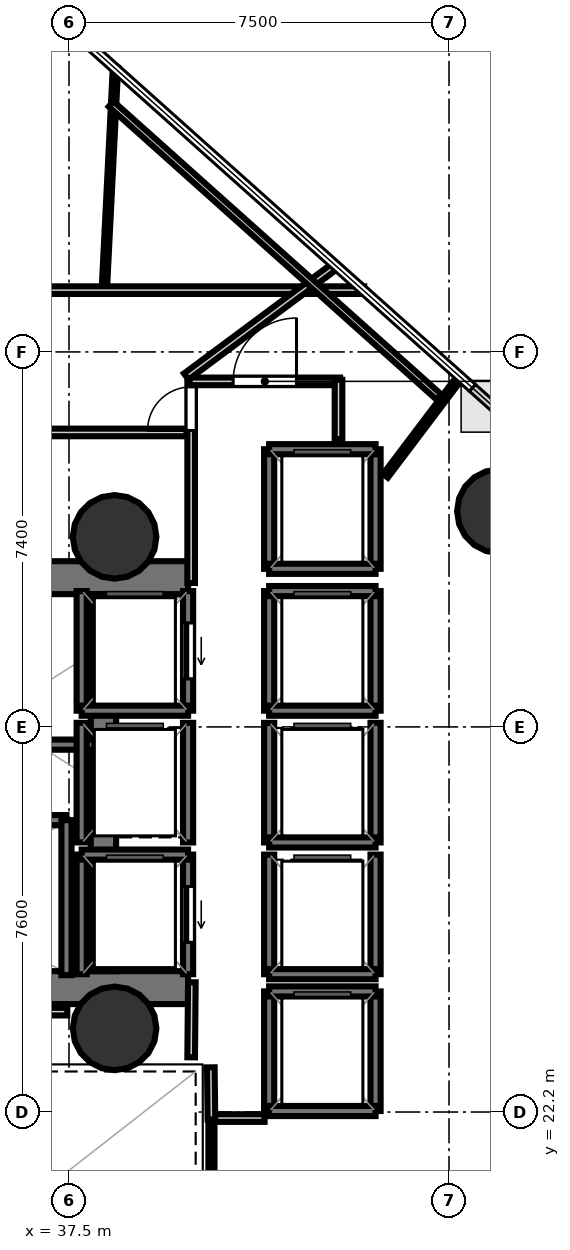
"""IFC4 building model, lengths in metres.
Left out: names, types, materials, properties, quantities, classifications, styles, units other than length and angle.
Written with IfcOpenShell. Run it as: python <this file> out.ifc"""

import sys

from ifc_helpers import new_model, si_unit, direction, frame, frame_2d, origin, origin_2d, place, context, subcontext, project, spatial, rectangle, hollow_circle, extrude, element, fill, save


model = new_model("IFC4")
c1 = context("Model", 3, precision=1e-05, world=origin(), true_north=direction((0.0, 1.0)))
c2 = subcontext(c1, "Body", "Model", "MODEL_VIEW")
j1 = project(units=[si_unit("LENGTHUNIT", "METRE"), si_unit("PLANEANGLEUNIT", "RADIAN")], contexts=[c1])
p1 = place(None, origin())
s1 = spatial("IfcSite", under=j1, at=p1, CompositionType="ELEMENT")
p2 = place(p1, origin())
s2 = spatial("IfcBuilding", under=s1, at=p2, CompositionType="ELEMENT")
p3 = place(p2, frame((0.0, 0.0, 71.0)))
s3 = spatial("IfcBuildingStorey", under=s2, at=p3, CompositionType="ELEMENT", Elevation=71.0)
p4 = place(p3, frame((29.13, 32.745, 0.0), z_axis=(0.0, 0.0, 1.0), x_axis=(1.0, 0.0, 0.0)))
e1 = element("IfcWall", 1, at=p4, inside=s3, PredefinedType="SHEAR", context=c2, shape_type="SweptSolid", body=[
    extrude(rectangle(XDim=10.72, YDim=0.65, at=frame_2d((5.36, 0.0))), origin(), (0.0, 0.0, 1.0), 3.52),
])
p5 = place(p4, frame((1.095, 0.0, 0.0)))
e2 = element("IfcOpeningElement", 2, at=p5, cuts=e1, PredefinedType="OPENING", context=c2, shape_type="SweptSolid", body=[
    extrude(rectangle(XDim=1.25, YDim=2.15, at=frame_2d((0.625, 1.075))), frame((0.0, 0.335, 0.0), z_axis=(0.0, -1.0, 0.0), x_axis=(1.0, 0.0, 0.0)), (0.0, 0.0, 1.0), 0.67),
])
p6 = place(p3, frame((29.13, 24.655, 0.0), z_axis=(0.0, 0.0, 1.0), x_axis=(1.0, 0.0, 0.0)))
e3 = element("IfcWall", 3, at=p6, inside=s3, PredefinedType="SHEAR", context=c2, shape_type="SweptSolid", body=[
    extrude(rectangle(XDim=10.72, YDim=0.65, at=frame_2d((5.36, 0.0))), origin(), (0.0, 0.0, 1.0), 3.52),
])
p7 = place(p6, frame((0.895, 0.0, 0.0)))
e4 = element("IfcOpeningElement", 4, at=p7, cuts=e3, PredefinedType="OPENING", context=c2, shape_type="SweptSolid", body=[
    extrude(rectangle(XDim=1.25, YDim=2.15, at=frame_2d((0.625, 1.075))), frame((0.0, 0.335, 0.0), z_axis=(0.0, -1.0, 0.0), x_axis=(1.0, 0.0, 0.0)), (0.0, 0.0, 1.0), 0.67),
])
p8 = place(p3, frame((38.18, 24.98, 0.0), z_axis=(0.0, 0.0, 1.0), x_axis=(0.0, 1.0, 0.0)))
e5 = element("IfcWall", 5, at=p8, inside=s3, PredefinedType="SHEAR", context=c2, shape_type="SweptSolid", body=[
    extrude(rectangle(XDim=7.44, YDim=0.5, at=frame_2d((3.72, 0.0))), origin(), (0.0, 0.0, 1.0), 3.52),
])
for number, where, z_axis, x_axis in (
    (6, (38.4, 33.55, 0.0), (0.0, 0.0, 1.0), (1.0, 0.0, 0.0)),
    (7, (38.4, 23.85, 0.0), (0.0, 0.0, 1.0), (1.0, 0.0, 0.0)),
    (8, (45.984, 34.057, 0.0), (0.0, 0.0, 1.0), (1.0, 0.0, 0.0)),
):
    element("IfcColumn", number, at=place(p3, frame(where, z_axis=z_axis, x_axis=x_axis)), inside=s3, PredefinedType="COLUMN", context=c2, shape_type="SweptSolid", body=[
        extrude(hollow_circle(Radius=0.825, WallThickness=0.04, at=origin_2d()), origin(), (0.0, 0.0, 1.0), 3.7),
    ])
p9 = place(p3, frame((29.7, 29.45, 0.0), z_axis=(0.0, 0.0, 1.0), x_axis=(1.0, 0.0, 0.0)))
e9 = element("IfcWall", 9, at=p9, inside=s3, PredefinedType="SOLIDWALL", context=c2, shape_type="SweptSolid", body=[
    extrude(rectangle(XDim=8.3, YDim=0.2, at=frame_2d((4.15, 0.0))), origin(), (0.0, 0.0, 1.0), 3.52),
])
p10 = place(p3, frame((29.7, 27.96, 0.0), z_axis=(0.0, 0.0, 1.0), x_axis=(1.0, 0.0, 0.0)))
e10 = element("IfcWall", 10, at=p10, inside=s3, PredefinedType="SOLIDWALL", context=c2, shape_type="SweptSolid", body=[
    extrude(rectangle(XDim=7.75, YDim=0.2, at=frame_2d((3.875, 0.0))), origin(), (0.0, 0.0, 1.0), 3.52),
])
p11 = place(p3, frame((37.45, 24.9, 0.0), z_axis=(0.0, 0.0, 1.0), x_axis=(0.0, 1.0, 0.0)))
e11 = element("IfcWall", 11, at=p11, inside=s3, PredefinedType="SOLIDWALL", context=c2, shape_type="SweptSolid", body=[
    extrude(rectangle(XDim=3.06, YDim=0.2, at=frame_2d((1.53, 0.0))), origin(), (0.0, 0.0, 1.0), 3.52),
])
p12 = place(p3, frame((39.85, 30.12, 0.0), z_axis=(0.0, 0.0, 1.0), x_axis=(0.0, 1.0, 0.0)))
e12 = element("IfcWall", 12, at=p12, inside=s3, PredefinedType="SOLIDWALL", context=c2, shape_type="SweptSolid", body=[
    extrude(rectangle(XDim=2.36, YDim=0.2, at=frame_2d((1.18, 0.0))), origin(), (0.0, 0.0, 1.0), 3.52),
])
p13 = place(p12, frame((0.63, 0.0, 0.0)))
e13 = element("IfcOpeningElement", 13, at=p13, cuts=e12, PredefinedType="OPENING", context=c2, shape_type="SweptSolid", body=[
    extrude(rectangle(XDim=1.1, YDim=2.15, at=frame_2d((0.55, 1.075))), frame((0.0, 0.11, 0.0), z_axis=(0.0, -1.0, 0.0), x_axis=(1.0, 0.0, 0.0)), (0.0, 0.0, 1.0), 0.22),
])
p14 = place(p3, frame((37.75, 30.12, 0.0), z_axis=(0.0, 0.0, 1.0), x_axis=(0.0, 1.0, 0.0)))
e14 = element("IfcWall", 14, at=p14, inside=s3, PredefinedType="SOLIDWALL", context=c2, shape_type="SweptSolid", body=[
    extrude(rectangle(XDim=2.36, YDim=0.2, at=frame_2d((1.18, 0.0))), origin(), (0.0, 0.0, 1.0), 3.52),
])
p15 = place(p3, frame((37.75, 30.12, 0.0), z_axis=(0.0, 0.0, 1.0), x_axis=(1.0, 0.0, 0.0)))
e15 = element("IfcWall", 15, at=p15, inside=s3, PredefinedType="SOLIDWALL", context=c2, shape_type="SweptSolid", body=[
    extrude(rectangle(XDim=2.1, YDim=0.2, at=frame_2d((1.05, 0.0))), origin(), (0.0, 0.0, 1.0), 3.52),
])
p16 = place(p3, frame((39.85, 24.92, 0.0), z_axis=(0.0, 0.0, 1.0), x_axis=(0.0, 1.0, 0.0)))
e16 = element("IfcWall", 16, at=p16, inside=s3, PredefinedType="SOLIDWALL", context=c2, shape_type="SweptSolid", body=[
    extrude(rectangle(XDim=2.36, YDim=0.2, at=frame_2d((1.18, 0.0))), origin(), (0.0, 0.0, 1.0), 3.52),
])
p17 = place(p16, frame((0.63, 0.0, 0.0)))
e17 = element("IfcOpeningElement", 17, at=p17, cuts=e16, PredefinedType="OPENING", context=c2, shape_type="SweptSolid", body=[
    extrude(rectangle(XDim=1.1, YDim=2.15, at=frame_2d((0.55, 1.075))), frame((0.0, 0.11, 0.0), z_axis=(0.0, -1.0, 0.0), x_axis=(1.0, 0.0, 0.0)), (0.0, 0.0, 1.0), 0.22),
])
p18 = place(p3, frame((37.75, 24.92, 0.0), z_axis=(0.0, 0.0, 1.0), x_axis=(0.0, 1.0, 0.0)))
e18 = element("IfcWall", 18, at=p18, inside=s3, PredefinedType="SOLIDWALL", context=c2, shape_type="SweptSolid", body=[
    extrude(rectangle(XDim=2.36, YDim=0.2, at=frame_2d((1.18, 0.0))), origin(), (0.0, 0.0, 1.0), 3.52),
])
p19 = place(p3, frame((37.75, 27.28, 0.0), z_axis=(0.0, 0.0, 1.0), x_axis=(1.0, 0.0, 0.0)))
e19 = element("IfcWall", 19, at=p19, inside=s3, PredefinedType="SOLIDWALL", context=c2, shape_type="SweptSolid", body=[
    extrude(rectangle(XDim=2.1, YDim=0.2, at=frame_2d((1.05, 0.0))), origin(), (0.0, 0.0, 1.0), 3.52),
])
for number, where, z_axis, x_axis in (
    (20, (43.55, 30.12, 0.0), (0.0, 0.0, 1.0), (0.0, 1.0, 0.0)),
    (21, (41.45, 30.12, 0.0), (0.0, 0.0, 1.0), (0.0, 1.0, 0.0)),
):
    element("IfcWall", number, at=place(p3, frame(where, z_axis=z_axis, x_axis=x_axis)), inside=s3, PredefinedType="SOLIDWALL", context=c2, shape_type="SweptSolid", body=[
        extrude(rectangle(XDim=2.36, YDim=0.2, at=frame_2d((1.18, 0.0))), origin(), (0.0, 0.0, 1.0), 3.52),
    ])
for number, where, z_axis, x_axis in (
    (22, (41.45, 32.48, 0.0), (0.0, 0.0, 1.0), (1.0, 0.0, 0.0)),
    (23, (41.45, 30.12, 0.0), (0.0, 0.0, 1.0), (1.0, 0.0, 0.0)),
):
    element("IfcWall", number, at=place(p3, frame(where, z_axis=z_axis, x_axis=x_axis)), inside=s3, PredefinedType="SOLIDWALL", context=c2, shape_type="SweptSolid", body=[
        extrude(rectangle(XDim=2.1, YDim=0.2, at=frame_2d((1.05, 0.0))), origin(), (0.0, 0.0, 1.0), 3.52),
    ])
for number, where, z_axis, x_axis in (
    (24, (43.55, 27.52, 0.0), (0.0, 0.0, 1.0), (0.0, 1.0, 0.0)),
    (25, (41.45, 27.52, 0.0), (0.0, 0.0, 1.0), (0.0, 1.0, 0.0)),
):
    element("IfcWall", number, at=place(p3, frame(where, z_axis=z_axis, x_axis=x_axis)), inside=s3, PredefinedType="SOLIDWALL", context=c2, shape_type="SweptSolid", body=[
        extrude(rectangle(XDim=2.36, YDim=0.2, at=frame_2d((1.18, 0.0))), origin(), (0.0, 0.0, 1.0), 3.52),
    ])
p20 = place(p3, frame((41.45, 27.52, 0.0), z_axis=(0.0, 0.0, 1.0), x_axis=(1.0, 0.0, 0.0)))
e26 = element("IfcWall", 26, at=p20, inside=s3, PredefinedType="SOLIDWALL", context=c2, shape_type="SweptSolid", body=[
    extrude(rectangle(XDim=2.1, YDim=0.2, at=frame_2d((1.05, 0.0))), origin(), (0.0, 0.0, 1.0), 3.52),
])
for number, where, z_axis, x_axis in (
    (27, (43.55, 24.92, 0.0), (0.0, 0.0, 1.0), (0.0, 1.0, 0.0)),
    (28, (41.45, 24.92, 0.0), (0.0, 0.0, 1.0), (0.0, 1.0, 0.0)),
):
    element("IfcWall", number, at=place(p3, frame(where, z_axis=z_axis, x_axis=x_axis)), inside=s3, PredefinedType="SOLIDWALL", context=c2, shape_type="SweptSolid", body=[
        extrude(rectangle(XDim=2.36, YDim=0.2, at=frame_2d((1.18, 0.0))), origin(), (0.0, 0.0, 1.0), 3.52),
    ])
p21 = place(p3, frame((41.45, 24.92, 0.0), z_axis=(0.0, 0.0, 1.0), x_axis=(1.0, 0.0, 0.0)))
e29 = element("IfcWall", 29, at=p21, inside=s3, PredefinedType="SOLIDWALL", context=c2, shape_type="SweptSolid", body=[
    extrude(rectangle(XDim=2.1, YDim=0.2, at=frame_2d((1.05, 0.0))), origin(), (0.0, 0.0, 1.0), 3.52),
])
for number, where, z_axis, x_axis in (
    (30, (39.85, 27.52, 0.0), (0.0, 0.0, 1.0), (0.0, 1.0, 0.0)),
    (31, (37.75, 27.52, 0.0), (0.0, 0.0, 1.0), (0.0, 1.0, 0.0)),
):
    element("IfcWall", number, at=place(p3, frame(where, z_axis=z_axis, x_axis=x_axis)), inside=s3, PredefinedType="SOLIDWALL", context=c2, shape_type="SweptSolid", body=[
        extrude(rectangle(XDim=2.36, YDim=0.2, at=frame_2d((1.18, 0.0))), origin(), (0.0, 0.0, 1.0), 3.52),
    ])
for number, where, z_axis, x_axis in (
    (32, (43.55, 22.22, 0.0), (0.0, 0.0, 1.0), (0.0, 1.0, 0.0)),
    (33, (41.45, 22.22, 0.0), (0.0, 0.0, 1.0), (0.0, 1.0, 0.0)),
):
    element("IfcWall", number, at=place(p3, frame(where, z_axis=z_axis, x_axis=x_axis)), inside=s3, PredefinedType="SOLIDWALL", context=c2, shape_type="SweptSolid", body=[
        extrude(rectangle(XDim=2.36, YDim=0.2, at=frame_2d((1.18, 0.0))), origin(), (0.0, 0.0, 1.0), 3.52),
    ])
for number, where, z_axis, x_axis in (
    (34, (41.45, 24.58, 0.0), (0.0, 0.0, 1.0), (1.0, 0.0, 0.0)),
    (35, (41.45, 22.22, 0.0), (0.0, 0.0, 1.0), (1.0, 0.0, 0.0)),
):
    element("IfcWall", number, at=place(p3, frame(where, z_axis=z_axis, x_axis=x_axis)), inside=s3, PredefinedType="SOLIDWALL", context=c2, shape_type="SweptSolid", body=[
        extrude(rectangle(XDim=2.1, YDim=0.2, at=frame_2d((1.05, 0.0))), origin(), (0.0, 0.0, 1.0), 3.52),
    ])
for number, where, z_axis, x_axis in (
    (36, (43.55, 32.92, 0.0), (0.0, 0.0, 1.0), (0.0, 1.0, 0.0)),
    (37, (41.45, 32.92, 0.0), (0.0, 0.0, 1.0), (0.0, 1.0, 0.0)),
):
    element("IfcWall", number, at=place(p3, frame(where, z_axis=z_axis, x_axis=x_axis)), inside=s3, PredefinedType="SOLIDWALL", context=c2, shape_type="SweptSolid", body=[
        extrude(rectangle(XDim=2.36, YDim=0.2, at=frame_2d((1.18, 0.0))), origin(), (0.0, 0.0, 1.0), 3.52),
    ])
for number, where, z_axis, x_axis in (
    (38, (41.45, 35.28, 0.0), (0.0, 0.0, 1.0), (1.0, 0.0, 0.0)),
    (39, (41.45, 32.92, 0.0), (0.0, 0.0, 1.0), (1.0, 0.0, 0.0)),
):
    element("IfcWall", number, at=place(p3, frame(where, z_axis=z_axis, x_axis=x_axis)), inside=s3, PredefinedType="SOLIDWALL", context=c2, shape_type="SweptSolid", body=[
        extrude(rectangle(XDim=2.1, YDim=0.2, at=frame_2d((1.05, 0.0))), origin(), (0.0, 0.0, 1.0), 3.52),
    ])
p22 = place(p3, frame((39.911, 32.64, 0.0), z_axis=(0.0, 0.0, 1.0), x_axis=(0.0, 1.0, 0.0)))
e40 = element("IfcWall", 40, at=p22, inside=s3, PredefinedType="PARTITIONING", context=c2, shape_type="SweptSolid", body=[
    extrude(rectangle(XDim=4.01, YDim=0.15, at=frame_2d((2.005, 0.0))), origin(), (0.0, 0.0, 1.0), 2.84),
])
p23 = place(p22, frame((3.01, 0.0, 0.0)))
e41 = element("IfcOpeningElement", 41, at=p23, cuts=e40, PredefinedType="OPENING", context=c2, shape_type="SweptSolid", body=[
    extrude(rectangle(XDim=0.86, YDim=2.05, at=frame_2d((0.43, 1.025))), frame((0.0, 0.085, 0.0), z_axis=(0.0, -1.0, 0.0), x_axis=(1.0, 0.0, 0.0)), (0.0, 0.0, 1.0), 0.17),
])
p24 = place(p3, frame((39.88, 36.619, 0.0), z_axis=(0.0, 0.0, 1.0), x_axis=(1.0, 0.0, 0.0)))
e42 = element("IfcWall", 42, at=p24, inside=s3, PredefinedType="PARTITIONING", context=c2, shape_type="SweptSolid", body=[
    extrude(rectangle(XDim=2.97, YDim=0.15, at=frame_2d((1.485, 0.0))), origin(), (0.0, 0.0, 1.0), 2.798),
])
p25 = place(p24, frame((0.86, 0.0, 0.0)))
e43 = element("IfcOpeningElement", 43, at=p25, cuts=e42, PredefinedType="OPENING", context=c2, shape_type="SweptSolid", body=[
    extrude(rectangle(XDim=1.25, YDim=2.2, at=frame_2d((0.625, 1.1))), frame((0.0, 0.085, 0.0), z_axis=(0.0, -1.0, 0.0), x_axis=(1.0, 0.0, 0.0)), (0.0, 0.0, 1.0), 0.17),
])
p26 = place(p3, frame((42.819, 36.65, 0.0), z_axis=(0.0, 0.0, 1.0), x_axis=(0.0, -1.0, 0.0)))
e44 = element("IfcWall", 44, at=p26, inside=s3, PredefinedType="PARTITIONING", context=c2, shape_type="SweptSolid", body=[
    extrude(rectangle(XDim=1.17, YDim=0.15, at=frame_2d((0.585, 0.0))), origin(), (0.0, 0.0, 1.0), 2.798),
])
p27 = place(p3, frame((41.36, 22.081, 0.0), z_axis=(0.0, 0.0, 1.0), x_axis=(-1.0, 0.0, 0.0)))
e45 = element("IfcWall", 45, at=p27, inside=s3, PredefinedType="PARTITIONING", context=c2, shape_type="SweptSolid", body=[
    extrude(rectangle(XDim=1.08, YDim=0.15, at=frame_2d((0.54, 0.0))), origin(), (0.0, 0.0, 1.0), 2.84),
])
p28 = place(p3, frame((40.311, 22.05, 0.0), z_axis=(0.0, 0.0, 1.0), x_axis=(-0.011836292006, 0.999929948642, 0.0)))
e46 = element("IfcWall", 46, at=p28, inside=s3, PredefinedType="PARTITIONING", context=c2, shape_type="SweptSolid", body=[
    extrude(rectangle(XDim=1.031, YDim=0.15, at=frame_2d((0.516, 0.0))), origin(), (0.0, 0.0, 1.0), 2.84),
])
p29 = place(p3, frame((39.911, 23.28, 0.0), z_axis=(0.0, 0.0, 1.0), x_axis=(0.009397771291, 0.999955839972, 0.0)))
e47 = element("IfcWall", 47, at=p29, inside=s3, PredefinedType="PARTITIONING", context=c2, shape_type="SweptSolid", body=[
    extrude(rectangle(XDim=1.481, YDim=0.15, at=frame_2d((0.74, 0.0))), origin(), (0.0, 0.0, 1.0), 2.84),
])
p30 = place(p3, frame((37.467, 24.181, 0.0), z_axis=(0.0, 0.0, 1.0), x_axis=(-1.0, 0.0, 0.0)))
e48 = element("IfcWall", 48, at=p30, inside=s3, PredefinedType="PARTITIONING", context=c2, shape_type="SweptSolid", body=[
    extrude(rectangle(XDim=3.937, YDim=0.15, at=frame_2d((1.968, 0.0))), origin(), (0.0, 0.0, 1.0), 2.84),
])
p31 = place(p3, frame((26.42, 38.419, 0.0), z_axis=(0.0, 0.0, 1.0), x_axis=(1.0, 0.0, 0.0)))
e49 = element("IfcWall", 49, at=p31, inside=s3, PredefinedType="PARTITIONING", context=c2, shape_type="SweptSolid", body=[
    extrude(rectangle(XDim=16.905, YDim=0.15, at=frame_2d((8.453, 0.0))), origin(), (0.0, 0.0, 1.0), 2.798),
])
p32 = place(p31, frame((5.754, 0.0, 0.0)))
e50 = element("IfcOpeningElement", 50, at=p32, cuts=e49, PredefinedType="OPENING", context=c2, shape_type="SweptSolid", body=[
    extrude(rectangle(XDim=0.9, YDim=2.1, at=frame_2d((0.45, 1.05))), frame((0.0, 0.085, 0.0), z_axis=(0.0, -1.0, 0.0), x_axis=(1.0, 0.0, 0.0)), (0.0, 0.0, 1.0), 0.17),
])
p33 = place(p3, frame((42.779, 38.916, 0.0), z_axis=(0.0, 0.0, 1.0), x_axis=(-0.802815270804, -0.596227843164, 0.0)))
e51 = element("IfcWall", 51, at=p33, inside=s3, PredefinedType="PARTITIONING", context=c2, shape_type="SweptSolid", body=[
    extrude(rectangle(XDim=3.693, YDim=0.15, at=frame_2d((1.847, 0.0))), origin(), (0.0, 0.0, 1.0), 2.798),
])
p34 = place(p3, frame((39.818, 35.611, 0.0), z_axis=(0.0, 0.0, 1.0), x_axis=(-1.0, 0.0, 0.0)))
e52 = element("IfcWall", 52, at=p34, inside=s3, PredefinedType="PARTITIONING", context=c2, shape_type="SweptSolid", body=[
    extrude(rectangle(XDim=2.768, YDim=0.15, at=frame_2d((1.384, 0.0))), origin(), (0.0, 0.0, 1.0), 2.84),
])
p35 = place(p3, frame((40.311, 18.0, 0.0), z_axis=(0.0, 0.0, 1.0), x_axis=(0.0, 1.0, 0.0)))
e53 = element("IfcWall", 53, at=p35, inside=s3, PredefinedType="PARTITIONING", context=c2, shape_type="SweptSolid", body=[
    extrude(rectangle(XDim=3.97, YDim=0.12, at=frame_2d((1.985, 0.0))), origin(), (0.0, 0.0, 1.0), 2.84),
])
p36 = place(p3, frame((43.745, 34.755, 0.0), z_axis=(0.0, 0.0, 1.0), x_axis=(0.602830289466, 0.797869439258, 0.0)))
e54 = element("IfcWall", 54, at=p36, inside=s3, PredefinedType="PARTITIONING", context=c2, shape_type="SweptSolid", body=[
    extrude(rectangle(XDim=2.467, YDim=0.12, at=frame_2d((1.234, 0.0))), origin(), (0.0, 0.0, 1.0), 2.798),
])
p37 = place(p3, frame((38.202, 38.528, 0.0), z_axis=(0.0, 0.0, 1.0), x_axis=(0.050179078892, 0.998740236519, 0.0)))
e55 = element("IfcWall", 55, at=p37, inside=s3, PredefinedType="PARTITIONING", context=c2, shape_type="SweptSolid", body=[
    extrude(rectangle(XDim=4.286, YDim=0.105, at=frame_2d((2.143, 0.0))), origin(), (0.0, 0.0, 1.0), 2.798),
])
p38 = place(p3, frame((38.33, 42.093, 0.0), z_axis=(0.0, 0.0, 1.0), x_axis=(0.745568655549, -0.666428825804, 0.0)))
e56 = element("IfcWall", 56, at=p38, inside=s3, PredefinedType="PARTITIONING", context=c2, shape_type="SweptSolid", body=[
    extrude(rectangle(XDim=8.678, YDim=0.14, at=frame_2d((4.339, 0.0))), origin(), (0.0, 0.0, 1.0), 2.84),
])
p39 = place(p13, origin())
e57 = element("IfcDoor", 57, at=p39, inside=s3, OperationType="SLIDING_TO_LEFT", PredefinedType="DOOR", context=c2, shape_type="SweptSolid", body=[
    extrude(rectangle(XDim=1.1, YDim=2.15, at=frame_2d((0.55, 1.075))), frame((0.0, 0.025, 0.0), z_axis=(0.0, -1.0, 0.0), x_axis=(1.0, 0.0, 0.0)), (0.0, 0.0, 1.0), 0.05),
])
fill(e13, e57)
p40 = place(p17, origin())
e58 = element("IfcDoor", 58, at=p40, inside=s3, OperationType="SLIDING_TO_LEFT", PredefinedType="DOOR", context=c2, shape_type="SweptSolid", body=[
    extrude(rectangle(XDim=1.1, YDim=2.15, at=frame_2d((0.55, 1.075))), frame((0.0, 0.025, 0.0), z_axis=(0.0, -1.0, 0.0), x_axis=(1.0, 0.0, 0.0)), (0.0, 0.0, 1.0), 0.05),
])
fill(e17, e58)
p41 = place(p23, origin())
e59 = element("IfcDoor", 59, at=p41, inside=s3, OperationType="SINGLE_SWING_LEFT", PredefinedType="DOOR", context=c2, shape_type="SweptSolid", body=[
    extrude(rectangle(XDim=0.86, YDim=2.05, at=frame_2d((0.43, 1.025))), frame((0.0, 0.025, 0.0), z_axis=(0.0, -1.0, 0.0), x_axis=(1.0, 0.0, 0.0)), (0.0, 0.0, 1.0), 0.05),
])
fill(e41, e59)
p42 = place(p25, origin())
e60 = element("IfcDoor", 60, at=p42, inside=s3, OperationType="SINGLE_SWING_RIGHT", PredefinedType="DOOR", context=c2, shape_type="SweptSolid", body=[
    extrude(rectangle(XDim=1.25, YDim=2.2, at=frame_2d((0.625, 1.1))), frame((0.0, 0.025, 0.0), z_axis=(0.0, -1.0, 0.0), x_axis=(1.0, 0.0, 0.0)), (0.0, 0.0, 1.0), 0.05),
])
fill(e43, e60)
save(model, sys.argv[1])
